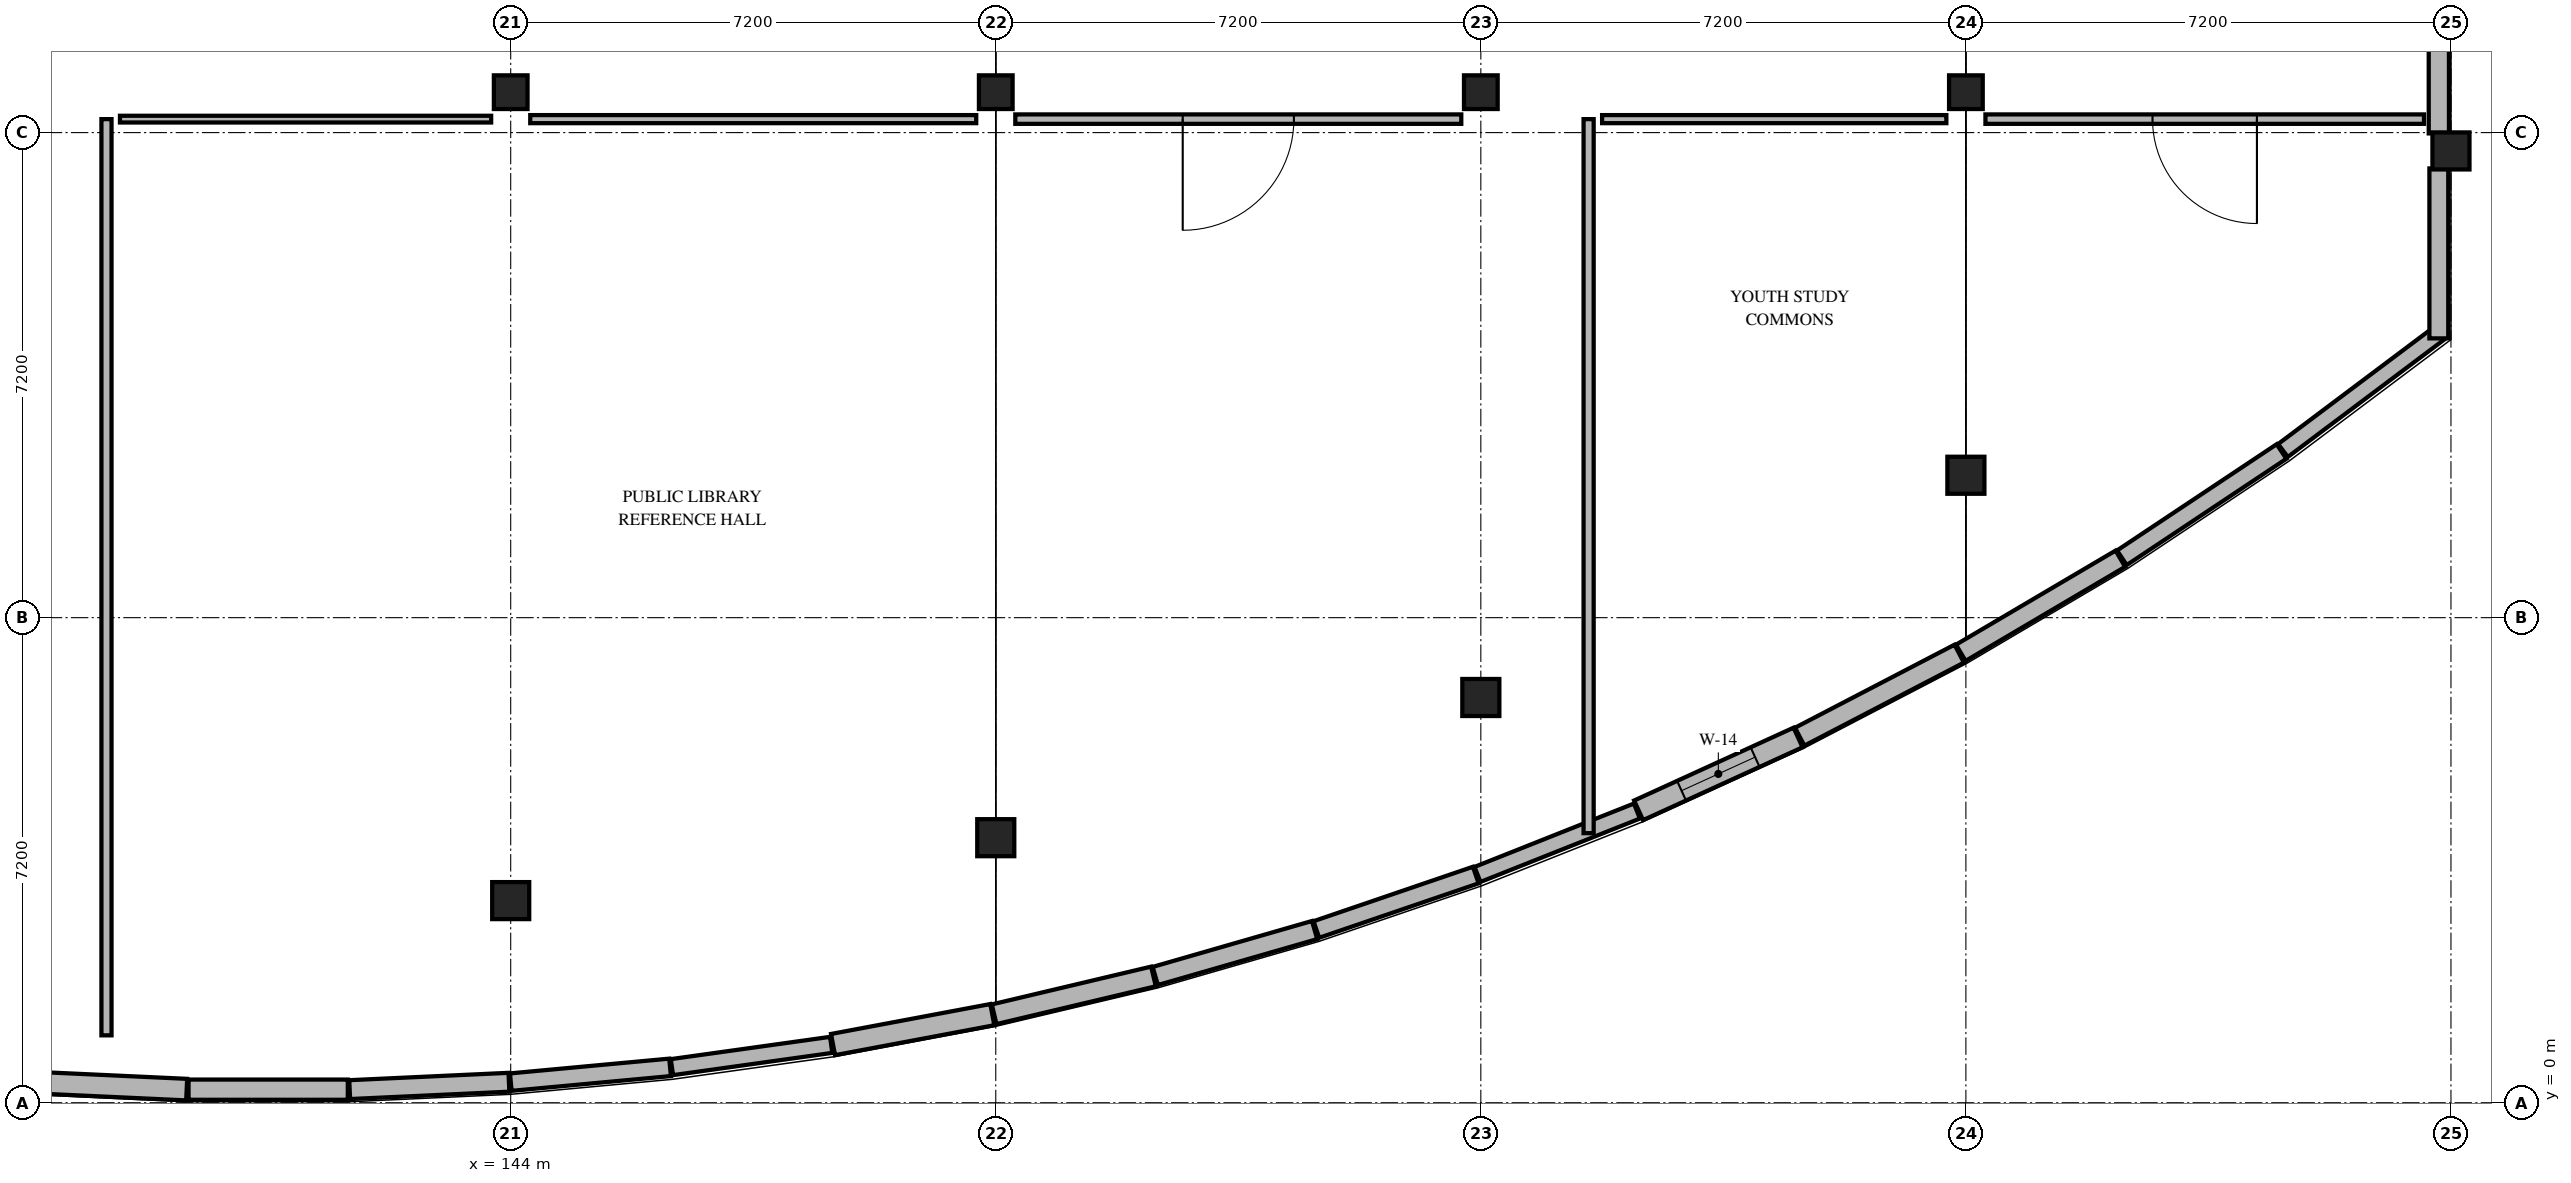
"""IFC4 building model, lengths in metres.
Left out: names, types, materials, properties, quantities, classifications, styles, units other than length and angle.
Written with IfcOpenShell. Run it as: python <this file> out.ifc"""

import sys

from ifc_helpers import new_model, si_unit, direction, frame, frame_2d, origin, origin_2d, place, context, subcontext, project, spatial, rectangle, extrude, element, fill, save


model = new_model("IFC4")
c1 = context("Model", 3, precision=1e-05, world=origin(), true_north=direction((0.0, 1.0)))
c2 = subcontext(c1, "Body", "Model", "MODEL_VIEW")
j1 = project(units=[si_unit("LENGTHUNIT", "METRE"), si_unit("PLANEANGLEUNIT", "RADIAN")], contexts=[c1])
p1 = place(None, origin())
s1 = spatial("IfcSite", under=j1, at=p1, CompositionType="ELEMENT")
p2 = place(p1, origin())
s2 = spatial("IfcBuilding", under=s1, at=p2, CompositionType="ELEMENT")
p3 = place(p2, frame((0.0, 0.0, 12.9)))
s3 = spatial("IfcBuildingStorey", under=s2, at=p3, CompositionType="ELEMENT", Elevation=12.9)
p4 = place(p3, frame((144.0, 3.0, 0.0), z_axis=(0.0, 0.0, 1.0), x_axis=(1.0, 0.0, 0.0)))
e1 = element("IfcColumn", 1, at=p4, inside=s3, PredefinedType="COLUMN", context=c2, shape_type="SweptSolid", body=[
    extrude(rectangle(XDim=0.55, YDim=0.55, at=origin_2d()), origin(), (0.0, 0.0, 1.0), 3.9),
])
p5 = place(p3, frame((144.0, 15.0, 0.0), z_axis=(0.0, 0.0, 1.0), x_axis=(1.0, 0.0, 0.0)))
e2 = element("IfcColumn", 2, at=p5, inside=s3, PredefinedType="COLUMN", context=c2, shape_type="SweptSolid", body=[
    extrude(rectangle(XDim=0.5, YDim=0.5, at=origin_2d()), origin(), (0.0, 0.0, 1.0), 3.9),
])
p6 = place(p3, frame((151.2, 3.934, 0.0), z_axis=(0.0, 0.0, 1.0), x_axis=(1.0, 0.0, 0.0)))
e3 = element("IfcColumn", 3, at=p6, inside=s3, PredefinedType="COLUMN", context=c2, shape_type="SweptSolid", body=[
    extrude(rectangle(XDim=0.55, YDim=0.55, at=origin_2d()), origin(), (0.0, 0.0, 1.0), 3.9),
])
p7 = place(p3, frame((151.2, 15.0, 0.0), z_axis=(0.0, 0.0, 1.0), x_axis=(1.0, 0.0, 0.0)))
e4 = element("IfcColumn", 4, at=p7, inside=s3, PredefinedType="COLUMN", context=c2, shape_type="SweptSolid", body=[
    extrude(rectangle(XDim=0.5, YDim=0.5, at=origin_2d()), origin(), (0.0, 0.0, 1.0), 3.9),
])
p8 = place(p3, frame((158.4, 6.015, 0.0), z_axis=(0.0, 0.0, 1.0), x_axis=(1.0, 0.0, 0.0)))
e5 = element("IfcColumn", 5, at=p8, inside=s3, PredefinedType="COLUMN", context=c2, shape_type="SweptSolid", body=[
    extrude(rectangle(XDim=0.55, YDim=0.55, at=origin_2d()), origin(), (0.0, 0.0, 1.0), 3.9),
])
p9 = place(p3, frame((158.4, 15.0, 0.0), z_axis=(0.0, 0.0, 1.0), x_axis=(1.0, 0.0, 0.0)))
e6 = element("IfcColumn", 6, at=p9, inside=s3, PredefinedType="COLUMN", context=c2, shape_type="SweptSolid", body=[
    extrude(rectangle(XDim=0.5, YDim=0.5, at=origin_2d()), origin(), (0.0, 0.0, 1.0), 3.9),
])
p10 = place(p3, frame((165.6, 9.314, 0.0), z_axis=(0.0, 0.0, 1.0), x_axis=(1.0, 0.0, 0.0)))
e7 = element("IfcColumn", 7, at=p10, inside=s3, PredefinedType="COLUMN", context=c2, shape_type="SweptSolid", body=[
    extrude(rectangle(XDim=0.55, YDim=0.55, at=origin_2d()), origin(), (0.0, 0.0, 1.0), 3.9),
])
p11 = place(p3, frame((165.6, 15.0, 0.0), z_axis=(0.0, 0.0, 1.0), x_axis=(1.0, 0.0, 0.0)))
e8 = element("IfcColumn", 8, at=p11, inside=s3, PredefinedType="COLUMN", context=c2, shape_type="SweptSolid", body=[
    extrude(rectangle(XDim=0.5, YDim=0.5, at=origin_2d()), origin(), (0.0, 0.0, 1.0), 3.9),
])
p12 = place(p3, frame((172.8, 14.128, 0.0), z_axis=(0.0, 0.0, 1.0), x_axis=(1.0, 0.0, 0.0)))
e9 = element("IfcColumn", 9, at=p12, inside=s3, PredefinedType="COLUMN", context=c2, shape_type="SweptSolid", body=[
    extrude(rectangle(XDim=0.55, YDim=0.55, at=origin_2d()), origin(), (0.0, 0.0, 1.0), 3.9),
])
p13 = place(p3, frame((139.19, 0.195, 0.0), z_axis=(0.0, 0.0, 1.0), x_axis=(-0.998935951808, 0.046119021944, 0.0)))
e10 = element("IfcWall", 10, at=p13, inside=s3, PredefinedType="SOLIDWALL", context=c2, shape_type="SweptSolid", body=[
    extrude(rectangle(XDim=2.366, YDim=0.32, at=frame_2d((1.183, 0.0))), origin(), (0.0, 0.0, 1.0), 3.66),
])
p14 = place(p3, frame((141.582, 0.194, 0.0), z_axis=(0.0, 0.0, 1.0), x_axis=(-1.0, 0.0, 0.0)))
e11 = element("IfcWall", 11, at=p14, inside=s3, PredefinedType="SOLIDWALL", context=c2, shape_type="SweptSolid", body=[
    extrude(rectangle(XDim=2.364, YDim=0.3, at=frame_2d((1.182, 0.0))), origin(), (0.0, 0.0, 1.0), 3.66),
])
p15 = place(p3, frame((143.974, 0.304, 0.0), z_axis=(0.0, 0.0, 1.0), x_axis=(-0.998936171223, -0.046114269187, 0.0)))
e12 = element("IfcWall", 12, at=p15, inside=s3, PredefinedType="SOLIDWALL", context=c2, shape_type="SweptSolid", body=[
    extrude(rectangle(XDim=2.366, YDim=0.28, at=frame_2d((1.183, 0.0))), origin(), (0.0, 0.0, 1.0), 3.66),
])
p16 = place(p3, frame((146.365, 0.525, 0.0), z_axis=(0.0, 0.0, 1.0), x_axis=(-0.995728078612, -0.092334140293, 0.0)))
e13 = element("IfcWall", 13, at=p16, inside=s3, PredefinedType="SOLIDWALL", context=c2, shape_type="SweptSolid", body=[
    extrude(rectangle(XDim=2.375, YDim=0.26, at=frame_2d((1.187, 0.0))), origin(), (0.0, 0.0, 1.0), 3.66),
])
p17 = place(p3, frame((148.757, 0.859, 0.0), z_axis=(0.0, 0.0, 1.0), x_axis=(-0.990368406077, -0.138457286714, 0.0)))
e14 = element("IfcWall", 14, at=p17, inside=s3, PredefinedType="SOLIDWALL", context=c2, shape_type="SweptSolid", body=[
    extrude(rectangle(XDim=2.387, YDim=0.24, at=frame_2d((1.194, 0.0))), origin(), (0.0, 0.0, 1.0), 3.66),
])
p18 = place(p3, frame((151.149, 1.308, 0.0), z_axis=(0.0, 0.0, 1.0), x_axis=(-0.982800895809, -0.184668349202, 0.0)))
e15 = element("IfcWall", 15, at=p18, inside=s3, PredefinedType="SOLIDWALL", context=c2, shape_type="SweptSolid", body=[
    extrude(rectangle(XDim=2.406, YDim=0.32, at=frame_2d((1.203, 0.0))), origin(), (0.0, 0.0, 1.0), 3.66),
])
p19 = place(p3, frame((153.541, 1.874, 0.0), z_axis=(0.0, 0.0, 1.0), x_axis=(-0.973001991893, -0.230796715253, 0.0)))
e16 = element("IfcWall", 16, at=p19, inside=s3, PredefinedType="SOLIDWALL", context=c2, shape_type="SweptSolid", body=[
    extrude(rectangle(XDim=2.431, YDim=0.3, at=frame_2d((1.215, 0.0))), origin(), (0.0, 0.0, 1.0), 3.66),
])
p20 = place(p3, frame((155.933, 2.563, 0.0), z_axis=(0.0, 0.0, 1.0), x_axis=(-0.960873855282, -0.276986343049, 0.0)))
e17 = element("IfcWall", 17, at=p20, inside=s3, PredefinedType="SOLIDWALL", context=c2, shape_type="SweptSolid", body=[
    extrude(rectangle(XDim=2.462, YDim=0.28, at=frame_2d((1.231, 0.0))), origin(), (0.0, 0.0, 1.0), 3.66),
])
p21 = place(p3, frame((158.325, 3.379, 0.0), z_axis=(0.0, 0.0, 1.0), x_axis=(-0.946323632671, -0.323220640196, 0.0)))
e18 = element("IfcWall", 18, at=p21, inside=s3, PredefinedType="SOLIDWALL", context=c2, shape_type="SweptSolid", body=[
    extrude(rectangle(XDim=2.5, YDim=0.26, at=frame_2d((1.25, 0.0))), origin(), (0.0, 0.0, 1.0), 3.66),
])
p22 = place(p3, frame((160.717, 4.329, 0.0), z_axis=(0.0, 0.0, 1.0), x_axis=(-0.929287640724, -0.369356847504, 0.0)))
e19 = element("IfcWall", 19, at=p22, inside=s3, PredefinedType="SOLIDWALL", context=c2, shape_type="SweptSolid", body=[
    extrude(rectangle(XDim=2.547, YDim=0.24, at=frame_2d((1.273, 0.0))), origin(), (0.0, 0.0, 1.0), 3.06),
])
p23 = place(p3, frame((163.109, 5.421, 0.0), z_axis=(0.0, 0.0, 1.0), x_axis=(-0.90959706885, -0.415491482873, 0.0)))
e20 = element("IfcWall", 20, at=p23, inside=s3, PredefinedType="SOLIDWALL", context=c2, shape_type="SweptSolid", body=[
    extrude(rectangle(XDim=2.603, YDim=0.32, at=frame_2d((1.301, 0.0))), origin(), (0.0, 0.0, 1.0), 3.66),
])
p24 = place(p23, frame((0.701, 0.0, 0.75)))
e21 = element("IfcOpeningElement", 21, at=p24, cuts=e20, PredefinedType="OPENING", context=c2, shape_type="SweptSolid", body=[
    extrude(rectangle(XDim=1.2, YDim=1.5, at=frame_2d((0.6, 0.75))), frame((0.0, 0.17, 0.0), z_axis=(0.0, -1.0, 0.0), x_axis=(1.0, 0.0, 0.0)), (0.0, 0.0, 1.0), 0.34),
])
p25 = place(p3, frame((165.501, 6.666, 0.0), z_axis=(0.0, 0.0, 1.0), x_axis=(-0.887067024949, -0.461640653808, 0.0)))
e22 = element("IfcWall", 22, at=p25, inside=s3, PredefinedType="SOLIDWALL", context=c2, shape_type="SweptSolid", body=[
    extrude(rectangle(XDim=2.67, YDim=0.3, at=frame_2d((1.335, 0.0))), origin(), (0.0, 0.0, 1.0), 3.06),
])
p26 = place(p3, frame((167.893, 8.075, 0.0), z_axis=(0.0, 0.0, 1.0), x_axis=(-0.861415701697, -0.507900569866, 0.0)))
e23 = element("IfcWall", 23, at=p26, inside=s3, PredefinedType="SOLIDWALL", context=c2, shape_type="SweptSolid", body=[
    extrude(rectangle(XDim=2.75, YDim=0.28, at=frame_2d((1.375, 0.0))), origin(), (0.0, 0.0, 1.0), 3.06),
])
p27 = place(p3, frame((170.285, 9.667, 0.0), z_axis=(0.0, 0.0, 1.0), x_axis=(-0.83248539698, -0.55404698701, 0.0)))
e24 = element("IfcWall", 24, at=p27, inside=s3, PredefinedType="SOLIDWALL", context=c2, shape_type="SweptSolid", body=[
    extrude(rectangle(XDim=2.847, YDim=0.26, at=frame_2d((1.423, 0.0))), origin(), (0.0, 0.0, 1.0), 3.06),
])
p28 = place(p3, frame((172.677, 11.461, 0.0), z_axis=(0.0, 0.0, 1.0), x_axis=(-0.799802311873, -0.600263493744, 0.0)))
e25 = element("IfcWall", 25, at=p28, inside=s3, PredefinedType="SOLIDWALL", context=c2, shape_type="SweptSolid", body=[
    extrude(rectangle(XDim=2.965, YDim=0.24, at=frame_2d((1.482, 0.0))), origin(), (0.0, 0.0, 1.0), 3.06),
])
p29 = place(p3, frame((172.62, 22.165, 0.0), z_axis=(0.0, 0.0, 1.0), x_axis=(0.0, -1.0, 0.0)))
e26 = element("IfcWall", 26, at=p29, inside=s3, PredefinedType="SOLIDWALL", context=c2, shape_type="SweptSolid", body=[
    extrude(rectangle(XDim=7.777, YDim=0.3, at=frame_2d((3.889, 0.0))), origin(), (0.0, 0.0, 1.0), 2.91),
])
p30 = place(p29, frame((3.138, 0.0, 0.75)))
e27 = element("IfcOpeningElement", 27, at=p30, cuts=e26, PredefinedType="OPENING", context=c2, shape_type="SweptSolid", body=[
    extrude(rectangle(XDim=1.5, YDim=1.65, at=frame_2d((0.75, 0.825))), frame((0.0, 0.16, 0.0), z_axis=(0.0, -1.0, 0.0), x_axis=(1.0, 0.0, 0.0)), (0.0, 0.0, 1.0), 0.32),
])
p31 = place(p3, frame((172.62, 13.868, 0.0), z_axis=(0.0, 0.0, 1.0), x_axis=(0.0, -1.0, 0.0)))
e28 = element("IfcWall", 28, at=p31, inside=s3, PredefinedType="SOLIDWALL", context=c2, shape_type="SweptSolid", body=[
    extrude(rectangle(XDim=2.522, YDim=0.28, at=frame_2d((1.261, 0.0))), origin(), (0.0, 0.0, 1.0), 3.06),
])
p32 = place(p3, frame((138.0, 1.0, 0.0), z_axis=(0.0, 0.0, 1.0), x_axis=(0.0, 1.0, 0.0)))
e29 = element("IfcWall", 29, at=p32, inside=s3, PredefinedType="PARTITIONING", context=c2, shape_type="SweptSolid", body=[
    extrude(rectangle(XDim=13.6, YDim=0.15, at=frame_2d((6.8, 0.0))), origin(), (0.0, 0.0, 1.0), 2.91),
])
p33 = place(p3, frame((158.11, 14.6, 0.0), z_axis=(0.0, 0.0, 1.0), x_axis=(-1.0, 0.0, 0.0)))
e30 = element("IfcWall", 30, at=p33, inside=s3, PredefinedType="PARTITIONING", context=c2, shape_type="SweptSolid", body=[
    extrude(rectangle(XDim=6.62, YDim=0.14, at=frame_2d((3.31, 0.0))), origin(), (0.0, 0.0, 1.0), 3.66),
])
p34 = place(p33, frame((2.485, 0.0, 0.0)))
e31 = element("IfcOpeningElement", 31, at=p34, cuts=e30, PredefinedType="OPENING", context=c2, shape_type="SweptSolid", body=[
    extrude(rectangle(XDim=1.65, YDim=2.3, at=frame_2d((0.825, 1.15))), frame((0.0, 0.08, 0.0), z_axis=(0.0, -1.0, 0.0), x_axis=(1.0, 0.0, 0.0)), (0.0, 0.0, 1.0), 0.16),
])
p35 = place(p3, frame((150.91, 14.6, 0.0), z_axis=(0.0, 0.0, 1.0), x_axis=(-1.0, 0.0, 0.0)))
e32 = element("IfcWall", 32, at=p35, inside=s3, PredefinedType="PARTITIONING", context=c2, shape_type="SweptSolid", body=[
    extrude(rectangle(XDim=6.62, YDim=0.12, at=frame_2d((3.31, 0.0))), origin(), (0.0, 0.0, 1.0), 3.66),
])
p36 = place(p3, frame((143.71, 14.6, 0.0), z_axis=(0.0, 0.0, 1.0), x_axis=(-1.0, 0.0, 0.0)))
e33 = element("IfcWall", 33, at=p36, inside=s3, PredefinedType="PARTITIONING", context=c2, shape_type="SweptSolid", body=[
    extrude(rectangle(XDim=5.51, YDim=0.1, at=frame_2d((2.755, 0.0))), origin(), (0.0, 0.0, 1.0), 3.66),
])
p37 = place(p3, frame((160.0, 4.001, 0.0), z_axis=(0.0, 0.0, 1.0), x_axis=(0.0, 1.0, 0.0)))
e34 = element("IfcWall", 34, at=p37, inside=s3, PredefinedType="PARTITIONING", context=c2, shape_type="SweptSolid", body=[
    extrude(rectangle(XDim=10.599, YDim=0.15, at=frame_2d((5.299, 0.0))), origin(), (0.0, 0.0, 1.0), 2.9),
])
p38 = place(p3, frame((172.4, 14.6, 0.0), z_axis=(0.0, 0.0, 1.0), x_axis=(-1.0, 0.0, 0.0)))
e35 = element("IfcWall", 35, at=p38, inside=s3, PredefinedType="PARTITIONING", context=c2, shape_type="SweptSolid", body=[
    extrude(rectangle(XDim=6.51, YDim=0.14, at=frame_2d((3.255, 0.0))), origin(), (0.0, 0.0, 1.0), 3.66),
])
p39 = place(p38, frame((2.48, 0.0, 0.0)))
e36 = element("IfcOpeningElement", 36, at=p39, cuts=e35, PredefinedType="OPENING", context=c2, shape_type="SweptSolid", body=[
    extrude(rectangle(XDim=1.55, YDim=2.25, at=frame_2d((0.775, 1.125))), frame((0.0, 0.08, 0.0), z_axis=(0.0, -1.0, 0.0), x_axis=(1.0, 0.0, 0.0)), (0.0, 0.0, 1.0), 0.16),
])
p40 = place(p3, frame((165.31, 14.6, 0.0), z_axis=(0.0, 0.0, 1.0), x_axis=(-1.0, 0.0, 0.0)))
e37 = element("IfcWall", 37, at=p40, inside=s3, PredefinedType="PARTITIONING", context=c2, shape_type="SweptSolid", body=[
    extrude(rectangle(XDim=5.11, YDim=0.12, at=frame_2d((2.555, 0.0))), origin(), (0.0, 0.0, 1.0), 3.66),
])
p41 = place(p24, origin())
e38 = element("IfcWindow", 38, at=p41, inside=s3, PartitioningType="SINGLE_PANEL", PredefinedType="WINDOW", context=c2, shape_type="SweptSolid", body=[
    extrude(rectangle(XDim=1.2, YDim=1.5, at=frame_2d((0.6, 0.75))), frame((0.0, 0.03, 0.0), z_axis=(0.0, -1.0, 0.0), x_axis=(1.0, 0.0, 0.0)), (0.0, 0.0, 1.0), 0.06),
])
fill(e21, e38)
p42 = place(p34, origin())
e39 = element("IfcDoor", 39, at=p42, inside=s3, OperationType="SINGLE_SWING_RIGHT", PredefinedType="DOOR", context=c2, shape_type="SweptSolid", body=[
    extrude(rectangle(XDim=1.65, YDim=2.3, at=frame_2d((0.825, 1.15))), frame((0.0, 0.025, 0.0), z_axis=(0.0, -1.0, 0.0), x_axis=(1.0, 0.0, 0.0)), (0.0, 0.0, 1.0), 0.05),
])
fill(e31, e39)
p43 = place(p39, origin())
e40 = element("IfcDoor", 40, at=p43, inside=s3, OperationType="SINGLE_SWING_LEFT", PredefinedType="DOOR", context=c2, shape_type="SweptSolid", body=[
    extrude(rectangle(XDim=1.55, YDim=2.25, at=frame_2d((0.775, 1.125))), frame((0.0, 0.025, 0.0), z_axis=(0.0, -1.0, 0.0), x_axis=(1.0, 0.0, 0.0)), (0.0, 0.0, 1.0), 0.05),
])
fill(e36, e40)
save(model, sys.argv[1])
